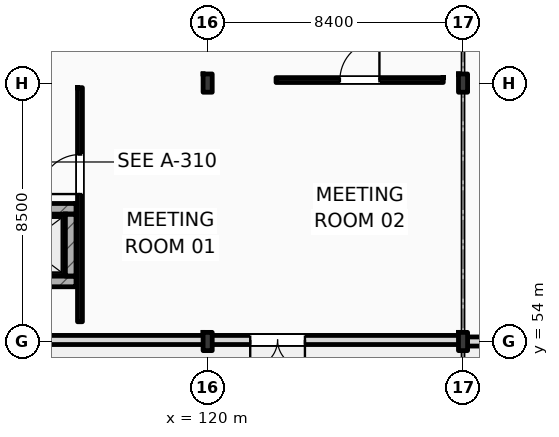
"""IFC4 building model, lengths in metres.
Left out: names, types, materials, properties, quantities, classifications, styles, units other than length and angle.
Written with IfcOpenShell. Run it as: python <this file> out.ifc"""

import sys

from ifc_helpers import new_model, si_unit, direction, frame, frame_2d, origin, origin_2d, place, context, subcontext, project, spatial, rectangle, i_section, extrude, element, fill, save


model = new_model("IFC4")
c1 = context("Model", 3, precision=1e-05, world=origin(), true_north=direction((0.0, 1.0)))
c2 = subcontext(c1, "Body", "Model", "MODEL_VIEW")
j1 = project(units=[si_unit("LENGTHUNIT", "METRE"), si_unit("PLANEANGLEUNIT", "RADIAN")], contexts=[c1])
p1 = place(None, origin())
s1 = spatial("IfcSite", under=j1, at=p1, CompositionType="ELEMENT")
p2 = place(p1, origin())
s2 = spatial("IfcBuilding", under=s1, at=p2, CompositionType="ELEMENT")
p3 = place(p2, origin())
s3 = spatial("IfcBuildingStorey", under=s2, at=p3, CompositionType="ELEMENT", Elevation=0.0)
for number, where, z_axis, x_axis in (
    (1, (120.0, 54.0, 0.0), (0.0, 0.0, 1.0), (1.0, 0.0, 0.0)),
    (2, (120.0, 62.5, 0.0), (0.0, 0.0, 1.0), (1.0, 0.0, 0.0)),
    (3, (128.4, 54.0, 0.0), (0.0, 0.0, 1.0), (1.0, 0.0, 0.0)),
    (4, (128.4, 62.5, 0.0), (0.0, 0.0, 1.0), (1.0, 0.0, 0.0)),
):
    element("IfcColumn", number, at=place(p3, frame(where, z_axis=z_axis, x_axis=x_axis)), inside=s3, PredefinedType="COLUMN", context=c2, shape_type="SweptSolid", body=[
        extrude(i_section(OverallWidth=0.3, OverallDepth=0.6, WebThickness=0.015, FlangeThickness=0.03, FilletRadius=0.027, at=origin_2d()), origin(), (0.0, 0.0, 1.0), 6.0),
    ])
p4 = place(p3, frame((128.4, 54.0, 0.0), z_axis=(0.0, 0.0, 1.0), x_axis=(1.0, 0.0, 0.0)))
e5 = element("IfcWall", 5, at=p4, inside=s3, PredefinedType="STANDARD", context=c2, shape_type="SweptSolid", body=[
    extrude(rectangle(XDim=9.0, YDim=0.3, at=frame_2d((4.5, 0.0))), origin(), (0.0, 0.0, 1.0), 5.09),
])
p5 = place(p4, frame((3.3, 0.0, 0.0)))
e6 = element("IfcOpeningElement", 6, at=p5, cuts=e5, PredefinedType="OPENING", context=c2, shape_type="SweptSolid", body=[
    extrude(rectangle(XDim=2.4, YDim=2.6, at=frame_2d((1.2, 1.3))), frame((0.0, 0.16, 0.0), z_axis=(0.0, -1.0, 0.0), x_axis=(1.0, 0.0, 0.0)), (0.0, 0.0, 1.0), 0.32),
])
p6 = place(p3, frame((103.2, 54.05, 0.0), z_axis=(0.0, 0.0, 1.0), x_axis=(1.0, 0.0, 0.0)))
e7 = element("IfcWall", 7, at=p6, inside=s3, PredefinedType="STANDARD", context=c2, shape_type="SweptSolid", body=[
    extrude(rectangle(XDim=25.15, YDim=0.3, at=frame_2d((12.575, 0.0))), origin(), (0.0, 0.0, 1.0), 5.14),
])
p7 = place(p6, frame((5.95, 0.0, 0.0)))
e8 = element("IfcOpeningElement", 8, at=p7, cuts=e7, PredefinedType="OPENING", context=c2, shape_type="SweptSolid", body=[
    extrude(rectangle(XDim=1.0, YDim=2.15, at=frame_2d((0.5, 1.075))), frame((0.0, 0.16, 0.0), z_axis=(0.0, -1.0, 0.0), x_axis=(1.0, 0.0, 0.0)), (0.0, 0.0, 1.0), 0.32),
])
p8 = place(p6, frame((18.2, 0.0, 0.0)))
e9 = element("IfcOpeningElement", 9, at=p8, cuts=e7, PredefinedType="OPENING", context=c2, shape_type="SweptSolid", body=[
    extrude(rectangle(XDim=1.8, YDim=2.4, at=frame_2d((0.9, 1.2))), frame((0.0, 0.16, 0.0), z_axis=(0.0, -1.0, 0.0), x_axis=(1.0, 0.0, 0.0)), (0.0, 0.0, 1.0), 0.32),
])
p9 = place(p3, frame((112.33, 58.365, 0.0), z_axis=(0.0, 0.0, 1.0), x_axis=(1.0, 0.0, 0.0)))
e10 = element("IfcWall", 10, at=p9, inside=s3, PredefinedType="SHEAR", context=c2, shape_type="SweptSolid", body=[
    extrude(rectangle(XDim=3.34, YDim=0.35, at=frame_2d((1.67, 0.0))), origin(), (0.0, 0.0, 1.0), 5.7),
])
p10 = place(p9, frame((1.045, 0.0, 0.0)))
e11 = element("IfcOpeningElement", 11, at=p10, cuts=e10, PredefinedType="OPENING", context=c2, shape_type="SweptSolid", body=[
    extrude(rectangle(XDim=1.25, YDim=2.25, at=frame_2d((0.625, 1.125))), frame((0.0, 0.185, 0.0), z_axis=(0.0, -1.0, 0.0), x_axis=(1.0, 0.0, 0.0)), (0.0, 0.0, 1.0), 0.37),
])
p11 = place(p3, frame((112.33, 55.975, 0.0), z_axis=(0.0, 0.0, 1.0), x_axis=(1.0, 0.0, 0.0)))
e12 = element("IfcWall", 12, at=p11, inside=s3, PredefinedType="SHEAR", context=c2, shape_type="SweptSolid", body=[
    extrude(rectangle(XDim=3.34, YDim=0.35, at=frame_2d((1.67, 0.0))), origin(), (0.0, 0.0, 1.0), 5.7),
])
p12 = place(p3, frame((115.495, 56.15, 0.0), z_axis=(0.0, 0.0, 1.0), x_axis=(0.0, 1.0, 0.0)))
e13 = element("IfcWall", 13, at=p12, inside=s3, PredefinedType="SHEAR", context=c2, shape_type="SweptSolid", body=[
    extrude(rectangle(XDim=2.04, YDim=0.35, at=frame_2d((1.02, 0.0))), origin(), (0.0, 0.0, 1.0), 5.7),
])
p13 = place(p3, frame((115.8, 54.65, 0.0), z_axis=(0.0, 0.0, 1.0), x_axis=(0.0, 1.0, 0.0)))
e14 = element("IfcWall", 14, at=p13, inside=s3, PredefinedType="PARTITIONING", context=c2, shape_type="SweptSolid", body=[
    extrude(rectangle(XDim=7.7, YDim=0.16, at=frame_2d((3.85, 0.0))), origin(), (0.0, 0.0, 1.0), 5.7),
])
p14 = place(p13, frame((4.2, 0.0, 0.0)))
e15 = element("IfcOpeningElement", 15, at=p14, cuts=e14, PredefinedType="OPENING", context=c2, shape_type="SweptSolid", body=[
    extrude(rectangle(XDim=1.3, YDim=2.2, at=frame_2d((0.65, 1.1))), frame((0.0, 0.09, 0.0), z_axis=(0.0, -1.0, 0.0), x_axis=(1.0, 0.0, 0.0)), (0.0, 0.0, 1.0), 0.18),
])
p15 = place(p3, frame((122.25, 62.6, 0.0), z_axis=(0.0, 0.0, 1.0), x_axis=(1.0, 0.0, 0.0)))
e16 = element("IfcWall", 16, at=p15, inside=s3, PredefinedType="PARTITIONING", context=c2, shape_type="SweptSolid", body=[
    extrude(rectangle(XDim=5.5, YDim=0.16, at=frame_2d((2.75, 0.0))), origin(), (0.0, 0.0, 1.0), 5.14),
])
p16 = place(p15, frame((2.1, 0.0, 0.0)))
e17 = element("IfcOpeningElement", 17, at=p16, cuts=e16, PredefinedType="OPENING", context=c2, shape_type="SweptSolid", body=[
    extrude(rectangle(XDim=1.3, YDim=2.2, at=frame_2d((0.65, 1.1))), frame((0.0, 0.09, 0.0), z_axis=(0.0, -1.0, 0.0), x_axis=(1.0, 0.0, 0.0)), (0.0, 0.0, 1.0), 0.18),
])
p17 = place(p8, frame((1.8, 0.0, 0.0), z_axis=(0.0, 0.0, 1.0), x_axis=(-1.0, 0.0, 0.0)))
e18 = element("IfcDoor", 18, at=p17, inside=s3, OperationType="DOUBLE_SWING_LEFT", PredefinedType="DOOR", context=c2, shape_type="SweptSolid", body=[
    extrude(rectangle(XDim=1.8, YDim=2.4, at=frame_2d((0.9, 1.2))), frame((0.0, 0.025, 0.0), z_axis=(0.0, -1.0, 0.0), x_axis=(1.0, 0.0, 0.0)), (0.0, 0.0, 1.0), 0.05),
])
fill(e9, e18)
p18 = place(p14, origin())
e19 = element("IfcDoor", 19, at=p18, inside=s3, OperationType="SINGLE_SWING_LEFT", PredefinedType="DOOR", context=c2, shape_type="SweptSolid", body=[
    extrude(rectangle(XDim=1.3, YDim=2.2, at=frame_2d((0.65, 1.1))), frame((0.0, 0.025, 0.0), z_axis=(0.0, -1.0, 0.0), x_axis=(1.0, 0.0, 0.0)), (0.0, 0.0, 1.0), 0.05),
])
fill(e15, e19)
p19 = place(p16, origin())
e20 = element("IfcDoor", 20, at=p19, inside=s3, OperationType="SINGLE_SWING_RIGHT", PredefinedType="DOOR", context=c2, shape_type="SweptSolid", body=[
    extrude(rectangle(XDim=1.3, YDim=2.2, at=frame_2d((0.65, 1.1))), frame((0.0, 0.025, 0.0), z_axis=(0.0, -1.0, 0.0), x_axis=(1.0, 0.0, 0.0)), (0.0, 0.0, 1.0), 0.05),
])
fill(e17, e20)
save(model, sys.argv[1])
